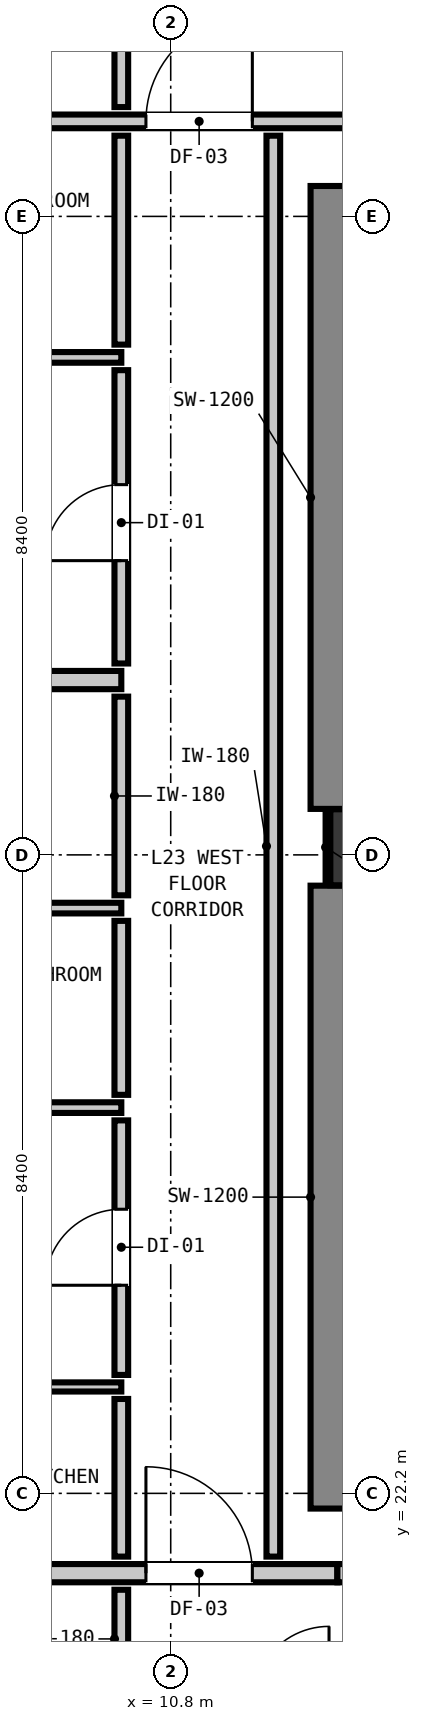
"""IFC4 building model, lengths in metres.
Left out: names, types, materials, properties, quantities, classifications, styles, units other than length and angle.
Written with IfcOpenShell. Run it as: python <this file> out.ifc"""

import sys

from ifc_helpers import new_model, si_unit, direction, frame, frame_2d, origin, origin_2d, place, context, subcontext, project, spatial, rectangle, extrude, element, fill, save


model = new_model("IFC4")
c1 = context("Model", 3, precision=1e-05, world=origin(), true_north=direction((0.0, 1.0)))
c2 = subcontext(c1, "Body", "Model", "MODEL_VIEW")
j1 = project(units=[si_unit("LENGTHUNIT", "METRE"), si_unit("PLANEANGLEUNIT", "RADIAN")], contexts=[c1])
p1 = place(None, origin())
s1 = spatial("IfcSite", under=j1, at=p1, CompositionType="ELEMENT")
p2 = place(p1, origin())
s2 = spatial("IfcBuilding", under=s1, at=p2, CompositionType="ELEMENT")
p3 = place(p2, frame((0.0, 0.0, 81.76)))
s3 = spatial("IfcBuildingStorey", under=s2, at=p3, CompositionType="ELEMENT", Elevation=81.76)
p4 = place(p3, frame((13.4, 30.7, 0.0), z_axis=(0.0, 0.0, 1.0), x_axis=(1.0, 0.0, 0.0)))
e1 = element("IfcColumn", 1, at=p4, inside=s3, PredefinedType="COLUMN", context=c2, shape_type="SweptSolid", body=[
    extrude(rectangle(XDim=1.0, YDim=1.0, at=origin_2d()), origin(), (0.0, 0.0, 1.0), 3.32),
])
p5 = place(p3, frame((13.24, 22.0, 0.0), z_axis=(0.0, 0.0, 1.0), x_axis=(0.0, 1.0, 0.0)))
e2 = element("IfcWall", 2, at=p5, inside=s3, PredefinedType="SHEAR", context=c2, shape_type="SweptSolid", body=[
    extrude(rectangle(XDim=8.195, YDim=1.2, at=frame_2d((4.098, 0.0))), origin(), (0.0, 0.0, 1.0), 3.32),
])
p6 = place(p3, frame((13.24, 31.205, 0.0), z_axis=(0.0, 0.0, 1.0), x_axis=(0.0, 1.0, 0.0)))
e3 = element("IfcWall", 3, at=p6, inside=s3, PredefinedType="SHEAR", context=c2, shape_type="SweptSolid", body=[
    extrude(rectangle(XDim=8.195, YDim=1.2, at=frame_2d((4.097, 0.0))), origin(), (0.0, 0.0, 1.0), 3.32),
])
p7 = place(p3, frame((2.657, 21.15, 0.0), z_axis=(0.0, 0.0, 1.0), x_axis=(1.0, 0.0, 0.0)))
e4 = element("IfcWall", 4, at=p7, inside=s3, PredefinedType="PARTITIONING", context=c2, shape_type="SweptSolid", body=[
    extrude(rectangle(XDim=10.336, YDim=0.24, at=frame_2d((5.168, 0.0))), origin(), (0.0, 0.0, 1.0), 2.445),
])
p8 = place(p7, frame((7.817, 0.0, 0.0)))
e5 = element("IfcOpeningElement", 5, at=p8, cuts=e4, PredefinedType="OPENING", context=c2, shape_type="SweptSolid", body=[
    extrude(rectangle(XDim=1.4, YDim=2.15, at=frame_2d((0.7, 1.075))), frame((0.0, 0.13, 0.0), z_axis=(0.0, -1.0, 0.0), x_axis=(1.0, 0.0, 0.0)), (0.0, 0.0, 1.0), 0.26),
])
p9 = place(p3, frame((12.993, 21.15, 0.0), z_axis=(0.0, 0.0, 1.0), x_axis=(1.0, 0.0, 0.0)))
e6 = element("IfcWall", 6, at=p9, inside=s3, PredefinedType="PARTITIONING", context=c2, shape_type="SweptSolid", body=[
    extrude(rectangle(XDim=30.98, YDim=0.24, at=frame_2d((15.49, 0.0))), origin(), (0.0, 0.0, 1.0), 3.06),
])
p10 = place(p9, frame((5.217, 0.0, 0.0)))
e7 = element("IfcOpeningElement", 7, at=p10, cuts=e6, PredefinedType="OPENING", context=c2, shape_type="SweptSolid", body=[
    extrude(rectangle(XDim=1.1, YDim=2.15, at=frame_2d((0.55, 1.075))), frame((0.0, 0.13, 0.0), z_axis=(0.0, -1.0, 0.0), x_axis=(1.0, 0.0, 0.0)), (0.0, 0.0, 1.0), 0.26),
])
p11 = place(p9, frame((27.358, 0.0, 0.0)))
e8 = element("IfcOpeningElement", 8, at=p11, cuts=e6, PredefinedType="OPENING", context=c2, shape_type="SweptSolid", body=[
    extrude(rectangle(XDim=1.0, YDim=2.15, at=frame_2d((0.5, 1.075))), frame((0.0, 0.13, 0.0), z_axis=(0.0, -1.0, 0.0), x_axis=(1.0, 0.0, 0.0)), (0.0, 0.0, 1.0), 0.26),
])
p12 = place(p3, frame((1.827, 32.9, 0.0), z_axis=(0.0, 0.0, 1.0), x_axis=(1.0, 0.0, 0.0)))
e9 = element("IfcWall", 9, at=p12, inside=s3, PredefinedType="PARTITIONING", context=c2, shape_type="SweptSolid", body=[
    extrude(rectangle(XDim=8.323, YDim=0.24, at=frame_2d((4.162, 0.0))), origin(), (0.0, 0.0, 1.0), 3.06),
])
p13 = place(p12, frame((3.698, 0.0, 0.0)))
e10 = element("IfcOpeningElement", 10, at=p13, cuts=e9, PredefinedType="OPENING", context=c2, shape_type="SweptSolid", body=[
    extrude(rectangle(XDim=0.9, YDim=2.1, at=frame_2d((0.45, 1.05))), frame((0.0, 0.13, 0.0), z_axis=(0.0, -1.0, 0.0), x_axis=(1.0, 0.0, 0.0)), (0.0, 0.0, 1.0), 0.26),
])
p14 = place(p3, frame((1.827, 40.25, 0.0), z_axis=(0.0, 0.0, 1.0), x_axis=(1.0, 0.0, 0.0)))
e11 = element("IfcWall", 11, at=p14, inside=s3, PredefinedType="PARTITIONING", context=c2, shape_type="SweptSolid", body=[
    extrude(rectangle(XDim=42.146, YDim=0.18, at=frame_2d((21.073, 0.0))), origin(), (0.0, 0.0, 1.0), 3.06),
])
p15 = place(p14, frame((15.608, 0.0, 0.0)))
e12 = element("IfcOpeningElement", 12, at=p15, cuts=e11, PredefinedType="OPENING", context=c2, shape_type="SweptSolid", body=[
    extrude(rectangle(XDim=1.4, YDim=2.15, at=frame_2d((0.7, 1.075))), frame((0.0, 0.1, 0.0), z_axis=(0.0, -1.0, 0.0), x_axis=(1.0, 0.0, 0.0)), (0.0, 0.0, 1.0), 0.2),
])
p16 = place(p14, frame((8.647, 0.0, 0.0)))
e13 = element("IfcOpeningElement", 13, at=p16, cuts=e11, PredefinedType="OPENING", context=c2, shape_type="SweptSolid", body=[
    extrude(rectangle(XDim=1.4, YDim=2.15, at=frame_2d((0.7, 1.075))), frame((0.0, 0.1, 0.0), z_axis=(0.0, -1.0, 0.0), x_axis=(1.0, 0.0, 0.0)), (0.0, 0.0, 1.0), 0.2),
])
p17 = place(p14, frame((38.524, 0.0, 0.0)))
e14 = element("IfcOpeningElement", 14, at=p17, cuts=e11, PredefinedType="OPENING", context=c2, shape_type="SweptSolid", body=[
    extrude(rectangle(XDim=1.0, YDim=2.15, at=frame_2d((0.5, 1.075))), frame((0.0, 0.1, 0.0), z_axis=(0.0, -1.0, 0.0), x_axis=(1.0, 0.0, 0.0)), (0.0, 0.0, 1.0), 0.2),
])
p18 = place(p3, frame((1.827, 27.275, 0.0), z_axis=(0.0, 0.0, 1.0), x_axis=(1.0, 0.0, 0.0)))
e15 = element("IfcWall", 15, at=p18, inside=s3, PredefinedType="PARTITIONING", context=c2, shape_type="SweptSolid", body=[
    extrude(rectangle(XDim=8.323, YDim=0.14, at=frame_2d((4.162, 0.0))), origin(), (0.0, 0.0, 1.0), 3.06),
])
p19 = place(p18, frame((6.085, 0.0, 0.0)))
e16 = element("IfcOpeningElement", 16, at=p19, cuts=e15, PredefinedType="OPENING", context=c2, shape_type="SweptSolid", body=[
    extrude(rectangle(XDim=0.86, YDim=2.02, at=frame_2d((0.43, 1.01))), frame((0.0, 0.08, 0.0), z_axis=(0.0, -1.0, 0.0), x_axis=(1.0, 0.0, 0.0)), (0.0, 0.0, 1.0), 0.16),
])
p20 = place(p18, frame((1.915, 0.0, 0.0)))
e17 = element("IfcOpeningElement", 17, at=p20, cuts=e15, PredefinedType="OPENING", context=c2, shape_type="SweptSolid", body=[
    extrude(rectangle(XDim=0.9, YDim=2.1, at=frame_2d((0.45, 1.05))), frame((0.0, 0.08, 0.0), z_axis=(0.0, -1.0, 0.0), x_axis=(1.0, 0.0, 0.0)), (0.0, 0.0, 1.0), 0.16),
])
p21 = place(p3, frame((1.827, 29.9, 0.0), z_axis=(0.0, 0.0, 1.0), x_axis=(1.0, 0.0, 0.0)))
e18 = element("IfcWall", 18, at=p21, inside=s3, PredefinedType="PARTITIONING", context=c2, shape_type="SweptSolid", body=[
    extrude(rectangle(XDim=8.323, YDim=0.14, at=frame_2d((4.162, 0.0))), origin(), (0.0, 0.0, 1.0), 3.06),
])
p22 = place(p3, frame((1.827, 37.145, 0.0), z_axis=(0.0, 0.0, 1.0), x_axis=(1.0, 0.0, 0.0)))
e19 = element("IfcWall", 19, at=p22, inside=s3, PredefinedType="PARTITIONING", context=c2, shape_type="SweptSolid", body=[
    extrude(rectangle(XDim=8.323, YDim=0.14, at=frame_2d((4.162, 0.0))), origin(), (0.0, 0.0, 1.0), 3.06),
])
p23 = place(p22, frame((6.085, 0.0, 0.0)))
e20 = element("IfcOpeningElement", 20, at=p23, cuts=e19, PredefinedType="OPENING", context=c2, shape_type="SweptSolid", body=[
    extrude(rectangle(XDim=0.86, YDim=2.02, at=frame_2d((0.43, 1.01))), frame((0.0, 0.08, 0.0), z_axis=(0.0, -1.0, 0.0), x_axis=(1.0, 0.0, 0.0)), (0.0, 0.0, 1.0), 0.16),
])
p24 = place(p22, frame((1.915, 0.0, 0.0)))
e21 = element("IfcOpeningElement", 21, at=p24, cuts=e19, PredefinedType="OPENING", context=c2, shape_type="SweptSolid", body=[
    extrude(rectangle(XDim=0.9, YDim=2.1, at=frame_2d((0.45, 1.05))), frame((0.0, 0.08, 0.0), z_axis=(0.0, -1.0, 0.0), x_axis=(1.0, 0.0, 0.0)), (0.0, 0.0, 1.0), 0.16),
])
p25 = place(p3, frame((1.827, 23.6, 0.0), z_axis=(0.0, 0.0, 1.0), x_axis=(1.0, 0.0, 0.0)))
e22 = element("IfcWall", 22, at=p25, inside=s3, PredefinedType="PARTITIONING", context=c2, shape_type="SweptSolid", body=[
    extrude(rectangle(XDim=8.323, YDim=0.12, at=frame_2d((4.162, 0.0))), origin(), (0.0, 0.0, 1.0), 3.06),
])
p26 = place(p25, frame((3.698, 0.0, 0.0)))
e23 = element("IfcOpeningElement", 23, at=p26, cuts=e22, PredefinedType="OPENING", context=c2, shape_type="SweptSolid", body=[
    extrude(rectangle(XDim=0.9, YDim=2.1, at=frame_2d((0.45, 1.05))), frame((0.0, 0.07, 0.0), z_axis=(0.0, -1.0, 0.0), x_axis=(1.0, 0.0, 0.0)), (0.0, 0.0, 1.0), 0.14),
])
p27 = place(p3, frame((10.15, 19.638, 0.0), z_axis=(0.0, 0.0, 1.0), x_axis=(0.0, 1.0, 0.0)))
e24 = element("IfcWall", 24, at=p27, inside=s3, PredefinedType="PARTITIONING", context=c2, shape_type="SweptSolid", body=[
    extrude(rectangle(XDim=1.294, YDim=0.18, at=frame_2d((0.647, 0.0))), origin(), (0.0, 0.0, 1.0), 3.06),
])
p28 = place(p3, frame((10.15, 21.368, 0.0), z_axis=(0.0, 0.0, 1.0), x_axis=(0.0, 1.0, 0.0)))
e25 = element("IfcWall", 25, at=p28, inside=s3, PredefinedType="PARTITIONING", context=c2, shape_type="SweptSolid", body=[
    extrude(rectangle(XDim=2.074, YDim=0.18, at=frame_2d((1.037, 0.0))), origin(), (0.0, 0.0, 1.0), 3.06),
])
p29 = place(p3, frame((10.15, 23.758, 0.0), z_axis=(0.0, 0.0, 1.0), x_axis=(0.0, 1.0, 0.0)))
e26 = element("IfcWall", 26, at=p29, inside=s3, PredefinedType="PARTITIONING", context=c2, shape_type="SweptSolid", body=[
    extrude(rectangle(XDim=3.349, YDim=0.18, at=frame_2d((1.674, 0.0))), origin(), (0.0, 0.0, 1.0), 3.06),
])
p30 = place(p29, frame((1.18, 0.0, 0.0)))
e27 = element("IfcOpeningElement", 27, at=p30, cuts=e26, PredefinedType="OPENING", context=c2, shape_type="SweptSolid", body=[
    extrude(rectangle(XDim=1.0, YDim=2.15, at=frame_2d((0.5, 1.075))), frame((0.0, 0.1, 0.0), z_axis=(0.0, -1.0, 0.0), x_axis=(1.0, 0.0, 0.0)), (0.0, 0.0, 1.0), 0.2),
])
p31 = place(p3, frame((10.15, 27.443, 0.0), z_axis=(0.0, 0.0, 1.0), x_axis=(0.0, 1.0, 0.0)))
e28 = element("IfcWall", 28, at=p31, inside=s3, PredefinedType="PARTITIONING", context=c2, shape_type="SweptSolid", body=[
    extrude(rectangle(XDim=2.289, YDim=0.18, at=frame_2d((1.145, 0.0))), origin(), (0.0, 0.0, 1.0), 3.06),
])
p32 = place(p3, frame((10.15, 30.068, 0.0), z_axis=(0.0, 0.0, 1.0), x_axis=(0.0, 1.0, 0.0)))
e29 = element("IfcWall", 29, at=p32, inside=s3, PredefinedType="PARTITIONING", context=c2, shape_type="SweptSolid", body=[
    extrude(rectangle(XDim=2.614, YDim=0.18, at=frame_2d((1.307, 0.0))), origin(), (0.0, 0.0, 1.0), 3.06),
])
p33 = place(p3, frame((10.15, 33.118, 0.0), z_axis=(0.0, 0.0, 1.0), x_axis=(0.0, 1.0, 0.0)))
e30 = element("IfcWall", 30, at=p33, inside=s3, PredefinedType="PARTITIONING", context=c2, shape_type="SweptSolid", body=[
    extrude(rectangle(XDim=3.859, YDim=0.18, at=frame_2d((1.93, 0.0))), origin(), (0.0, 0.0, 1.0), 3.06),
])
p34 = place(p33, frame((1.353, 0.0, 0.0)))
e31 = element("IfcOpeningElement", 31, at=p34, cuts=e30, PredefinedType="OPENING", context=c2, shape_type="SweptSolid", body=[
    extrude(rectangle(XDim=1.0, YDim=2.15, at=frame_2d((0.5, 1.075))), frame((0.0, 0.1, 0.0), z_axis=(0.0, -1.0, 0.0), x_axis=(1.0, 0.0, 0.0)), (0.0, 0.0, 1.0), 0.2),
])
p35 = place(p3, frame((10.15, 37.313, 0.0), z_axis=(0.0, 0.0, 1.0), x_axis=(0.0, 1.0, 0.0)))
e32 = element("IfcWall", 32, at=p35, inside=s3, PredefinedType="PARTITIONING", context=c2, shape_type="SweptSolid", body=[
    extrude(rectangle(XDim=2.749, YDim=0.18, at=frame_2d((1.375, 0.0))), origin(), (0.0, 0.0, 1.0), 3.06),
])
p36 = place(p3, frame((10.15, 40.438, 0.0), z_axis=(0.0, 0.0, 1.0), x_axis=(0.0, 1.0, 0.0)))
e33 = element("IfcWall", 33, at=p36, inside=s3, PredefinedType="PARTITIONING", context=c2, shape_type="SweptSolid", body=[
    extrude(rectangle(XDim=1.324, YDim=0.18, at=frame_2d((0.662, 0.0))), origin(), (0.0, 0.0, 1.0), 3.06),
])
p37 = place(p3, frame((12.15, 21.368, 0.0), z_axis=(0.0, 0.0, 1.0), x_axis=(0.0, 1.0, 0.0)))
e34 = element("IfcWall", 34, at=p37, inside=s3, PredefinedType="PARTITIONING", context=c2, shape_type="SweptSolid", body=[
    extrude(rectangle(XDim=18.694, YDim=0.18, at=frame_2d((9.347, 0.0))), origin(), (0.0, 0.0, 1.0), 3.06),
])
p38 = place(p3, frame((12.868, 30.21, 0.0), z_axis=(0.0, 0.0, 1.0), x_axis=(0.0, 1.0, 0.0)))
e35 = element("IfcWall", 35, at=p38, inside=s3, PredefinedType="PARTITIONING", context=c2, shape_type="SweptSolid", body=[
    extrude(rectangle(XDim=0.98, YDim=0.06, at=frame_2d((0.49, 0.0))), origin(), (0.0, 0.0, 1.0), 1.45),
])
p39 = place(p8, origin())
e36 = element("IfcDoor", 36, at=p39, inside=s3, OperationType="SINGLE_SWING_LEFT", PredefinedType="DOOR", context=c2, shape_type="SweptSolid", body=[
    extrude(rectangle(XDim=1.4, YDim=2.15, at=frame_2d((0.7, 1.075))), frame((0.0, 0.025, 0.0), z_axis=(0.0, -1.0, 0.0), x_axis=(1.0, 0.0, 0.0)), (0.0, 0.0, 1.0), 0.05),
])
fill(e5, e36)
p40 = place(p16, origin())
e37 = element("IfcDoor", 37, at=p40, inside=s3, OperationType="SINGLE_SWING_RIGHT", PredefinedType="DOOR", context=c2, shape_type="SweptSolid", body=[
    extrude(rectangle(XDim=1.4, YDim=2.15, at=frame_2d((0.7, 1.075))), frame((0.0, 0.025, 0.0), z_axis=(0.0, -1.0, 0.0), x_axis=(1.0, 0.0, 0.0)), (0.0, 0.0, 1.0), 0.05),
])
fill(e13, e37)
p41 = place(p30, origin())
e38 = element("IfcDoor", 38, at=p41, inside=s3, OperationType="SINGLE_SWING_LEFT", PredefinedType="DOOR", context=c2, shape_type="SweptSolid", body=[
    extrude(rectangle(XDim=1.0, YDim=2.15, at=frame_2d((0.5, 1.075))), frame((0.0, 0.025, 0.0), z_axis=(0.0, -1.0, 0.0), x_axis=(1.0, 0.0, 0.0)), (0.0, 0.0, 1.0), 0.05),
])
fill(e27, e38)
p42 = place(p34, origin())
e39 = element("IfcDoor", 39, at=p42, inside=s3, OperationType="SINGLE_SWING_LEFT", PredefinedType="DOOR", context=c2, shape_type="SweptSolid", body=[
    extrude(rectangle(XDim=1.0, YDim=2.15, at=frame_2d((0.5, 1.075))), frame((0.0, 0.025, 0.0), z_axis=(0.0, -1.0, 0.0), x_axis=(1.0, 0.0, 0.0)), (0.0, 0.0, 1.0), 0.05),
])
fill(e31, e39)
save(model, sys.argv[1])
